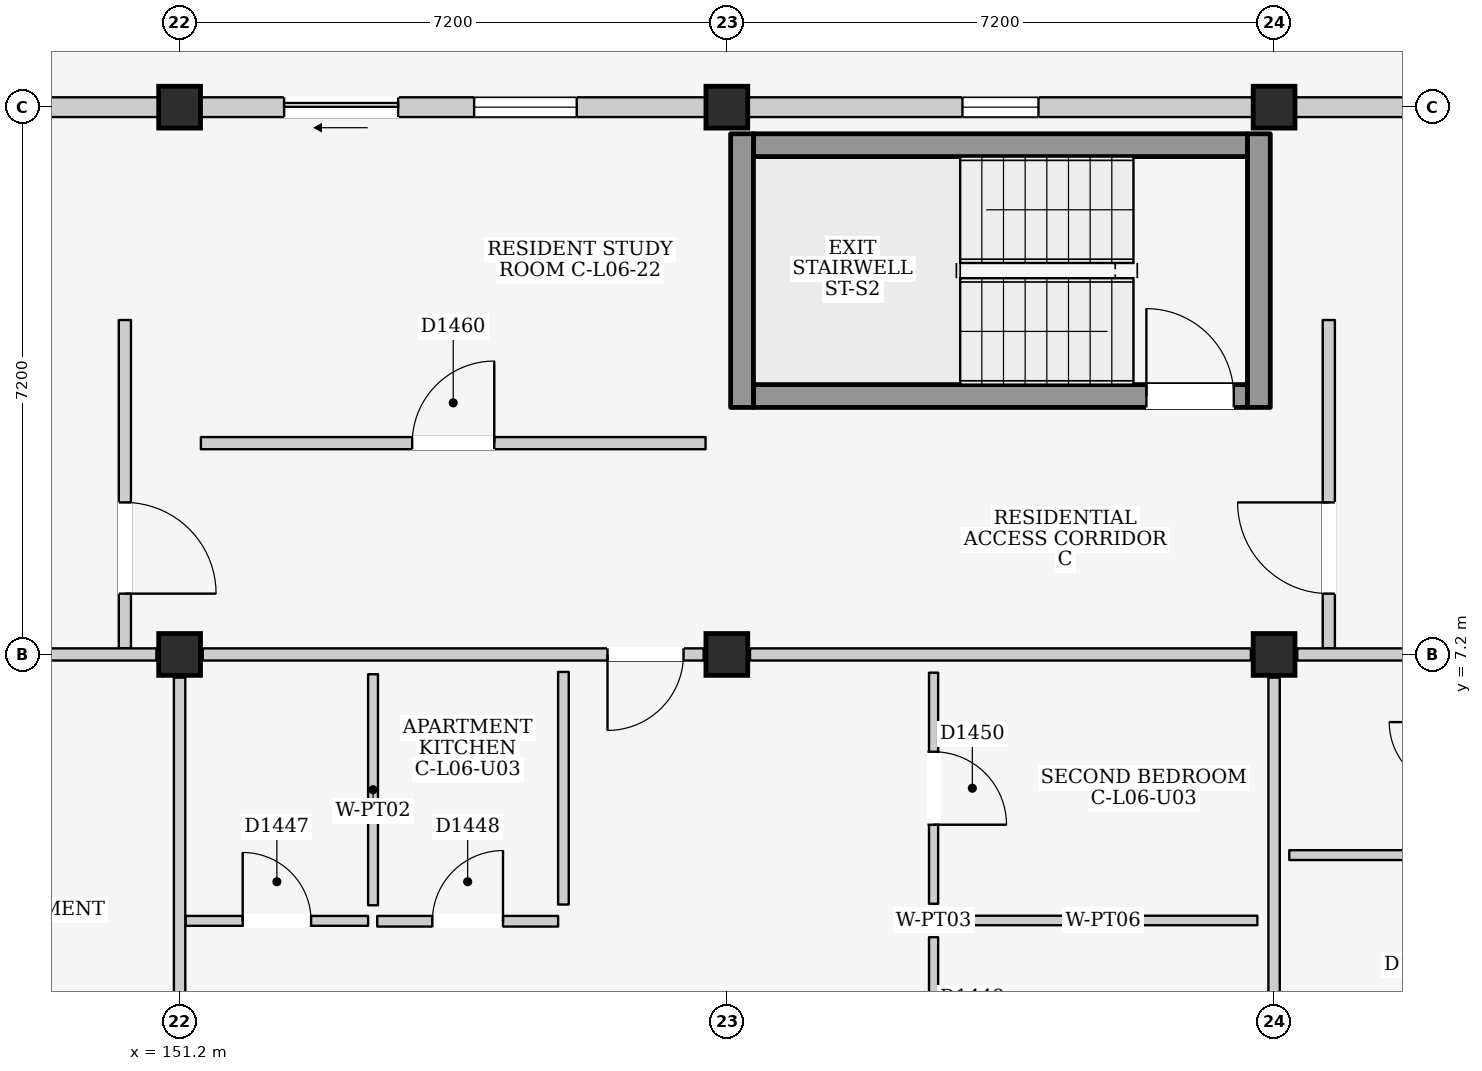
"""IFC4 building model, lengths in metres.
Left out: names, types, materials, properties, quantities, classifications, styles, units other than length and angle.
Written with IfcOpenShell. Run it as: python <this file> out.ifc"""

import sys

from ifc_helpers import new_model, si_unit, direction, frame, frame_2d, origin, origin_2d, place, context, subcontext, project, spatial, rectangle, extrude, element, fill, save


model = new_model("IFC4")
c1 = context("Model", 3, precision=1e-05, world=origin(), true_north=direction((0.0, 1.0)))
c2 = subcontext(c1, "Body", "Model", "MODEL_VIEW")
j1 = project(units=[si_unit("LENGTHUNIT", "METRE"), si_unit("PLANEANGLEUNIT", "RADIAN")], contexts=[c1])
p1 = place(None, origin())
s1 = spatial("IfcSite", under=j1, at=p1, CompositionType="ELEMENT")
p2 = place(p1, origin())
s2 = spatial("IfcBuilding", under=s1, at=p2, CompositionType="ELEMENT")
p3 = place(p2, frame((0.0, 0.0, 21.9)))
s3 = spatial("IfcBuildingStorey", under=s2, at=p3, CompositionType="ELEMENT", Elevation=21.9)
for number, where, z_axis, x_axis in (
    (1, (151.2, 7.2, 0.0), (0.0, 0.0, 1.0), (1.0, 0.0, 0.0)),
    (2, (151.2, 14.4, 0.0), (0.0, 0.0, 1.0), (1.0, 0.0, 0.0)),
    (3, (158.4, 7.2, 0.0), (0.0, 0.0, 1.0), (1.0, 0.0, 0.0)),
    (4, (158.4, 14.4, 0.0), (0.0, 0.0, 1.0), (1.0, 0.0, 0.0)),
    (5, (165.6, 7.2, 0.0), (0.0, 0.0, 1.0), (1.0, 0.0, 0.0)),
    (6, (165.6, 14.4, 0.0), (0.0, 0.0, 1.0), (1.0, 0.0, 0.0)),
):
    element("IfcColumn", number, at=place(p3, frame(where, z_axis=z_axis, x_axis=x_axis)), inside=s3, PredefinedType="COLUMN", context=c2, shape_type="SweptSolid", body=[
        extrude(rectangle(XDim=0.55, YDim=0.55, at=origin_2d()), origin(), (0.0, 0.0, 1.0), 3.2),
    ])
p4 = place(p3, frame((144.275, 14.4, 0.0), z_axis=(0.0, 0.0, 1.0), x_axis=(1.0, 0.0, 0.0)))
e7 = element("IfcWall", 7, at=p4, inside=s3, PredefinedType="ELEMENTEDWALL", context=c2, shape_type="SweptSolid", body=[
    extrude(rectangle(XDim=6.65, YDim=0.26, at=frame_2d((3.325, 0.0))), origin(), (0.0, 0.0, 1.0), 2.365),
])
p5 = place(p4, frame((2.825, 0.0, 1.2)))
e8 = element("IfcOpeningElement", 8, at=p5, cuts=e7, PredefinedType="OPENING", context=c2, shape_type="SweptSolid", body=[
    extrude(rectangle(XDim=1.0, YDim=0.9, at=frame_2d((0.5, 0.45))), frame((0.0, 0.145, 0.0), z_axis=(0.0, -1.0, 0.0), x_axis=(1.0, 0.0, 0.0)), (0.0, 0.0, 1.0), 0.29),
])
p6 = place(p3, frame((151.475, 14.4, 0.0), z_axis=(0.0, 0.0, 1.0), x_axis=(1.0, 0.0, 0.0)))
e9 = element("IfcWall", 9, at=p6, inside=s3, PredefinedType="ELEMENTEDWALL", context=c2, shape_type="SweptSolid", body=[
    extrude(rectangle(XDim=6.65, YDim=0.26, at=frame_2d((3.325, 0.0))), origin(), (0.0, 0.0, 1.0), 2.365),
])
p7 = place(p6, frame((1.1, 0.0, 0.0)))
e10 = element("IfcOpeningElement", 10, at=p7, cuts=e9, PredefinedType="OPENING", context=c2, shape_type="SweptSolid", body=[
    extrude(rectangle(XDim=1.5, YDim=2.12, at=frame_2d((0.75, 1.06))), frame((0.0, 0.145, 0.0), z_axis=(0.0, -1.0, 0.0), x_axis=(1.0, 0.0, 0.0)), (0.0, 0.0, 1.0), 0.29),
])
p8 = place(p6, frame((3.6, 0.0, 0.755)))
e11 = element("IfcOpeningElement", 11, at=p8, cuts=e9, PredefinedType="OPENING", context=c2, shape_type="SweptSolid", body=[
    extrude(rectangle(XDim=1.35, YDim=1.5, at=frame_2d((0.675, 0.75))), frame((0.0, 0.145, 0.0), z_axis=(0.0, -1.0, 0.0), x_axis=(1.0, 0.0, 0.0)), (0.0, 0.0, 1.0), 0.29),
])
p9 = place(p3, frame((158.675, 14.4, 0.0), z_axis=(0.0, 0.0, 1.0), x_axis=(1.0, 0.0, 0.0)))
e12 = element("IfcWall", 12, at=p9, inside=s3, PredefinedType="ELEMENTEDWALL", context=c2, shape_type="SweptSolid", body=[
    extrude(rectangle(XDim=6.65, YDim=0.26, at=frame_2d((3.325, 0.0))), origin(), (0.0, 0.0, 1.0), 2.365),
])
p10 = place(p9, frame((2.825, 0.0, 1.2)))
e13 = element("IfcOpeningElement", 13, at=p10, cuts=e12, PredefinedType="OPENING", context=c2, shape_type="SweptSolid", body=[
    extrude(rectangle(XDim=1.0, YDim=0.9, at=frame_2d((0.5, 0.45))), frame((0.0, 0.145, 0.0), z_axis=(0.0, -1.0, 0.0), x_axis=(1.0, 0.0, 0.0)), (0.0, 0.0, 1.0), 0.29),
])
p11 = place(p3, frame((165.875, 14.4, 0.0), z_axis=(0.0, 0.0, 1.0), x_axis=(1.0, 0.0, 0.0)))
e14 = element("IfcWall", 14, at=p11, inside=s3, PredefinedType="ELEMENTEDWALL", context=c2, shape_type="SweptSolid", body=[
    extrude(rectangle(XDim=6.65, YDim=0.26, at=frame_2d((3.325, 0.0))), origin(), (0.0, 0.0, 1.0), 2.365),
])
p12 = place(p11, frame((2.825, 0.0, 1.2)))
e15 = element("IfcOpeningElement", 15, at=p12, cuts=e14, PredefinedType="OPENING", context=c2, shape_type="SweptSolid", body=[
    extrude(rectangle(XDim=1.0, YDim=0.9, at=frame_2d((0.5, 0.45))), frame((0.0, 0.145, 0.0), z_axis=(0.0, -1.0, 0.0), x_axis=(1.0, 0.0, 0.0)), (0.0, 0.0, 1.0), 0.29),
])
p13 = place(p3, frame((150.48, 7.28, 0.0), z_axis=(0.0, 0.0, 1.0), x_axis=(0.0, 1.0, 0.0)))
e16 = element("IfcWall", 16, at=p13, inside=s3, PredefinedType="PARTITIONING", context=c2, shape_type="SweptSolid", body=[
    extrude(rectangle(XDim=4.32, YDim=0.16, at=frame_2d((2.16, 0.0))), origin(), (0.0, 0.0, 1.0), 2.98),
])
p14 = place(p13, frame((0.72, 0.0, 0.0)))
e17 = element("IfcOpeningElement", 17, at=p14, cuts=e16, PredefinedType="OPENING", context=c2, shape_type="SweptSolid", body=[
    extrude(rectangle(XDim=1.2, YDim=2.2, at=frame_2d((0.6, 1.1))), frame((0.0, 0.095, 0.0), z_axis=(0.0, -1.0, 0.0), x_axis=(1.0, 0.0, 0.0)), (0.0, 0.0, 1.0), 0.19),
])
p15 = place(p3, frame((158.75, 10.6, 0.0), z_axis=(0.0, 0.0, 1.0), x_axis=(1.0, 0.0, 0.0)))
e18 = element("IfcWall", 18, at=p15, inside=s3, PredefinedType="SHEAR", context=c2, shape_type="SweptSolid", body=[
    extrude(rectangle(XDim=6.5, YDim=0.3, at=frame_2d((3.25, 0.0))), origin(), (0.0, 0.0, 1.0), 2.98),
])
p16 = place(p15, frame((5.17, 0.0, 0.0)))
e19 = element("IfcOpeningElement", 19, at=p16, cuts=e18, PredefinedType="OPENING", context=c2, shape_type="SweptSolid", body=[
    extrude(rectangle(XDim=1.15, YDim=2.2, at=frame_2d((0.575, 1.1))), frame((0.0, 0.165, 0.0), z_axis=(0.0, -1.0, 0.0), x_axis=(1.0, 0.0, 0.0)), (0.0, 0.0, 1.0), 0.33),
])
p17 = place(p3, frame((158.75, 13.9, 0.0), z_axis=(0.0, 0.0, 1.0), x_axis=(1.0, 0.0, 0.0)))
e20 = element("IfcWall", 20, at=p17, inside=s3, PredefinedType="SHEAR", context=c2, shape_type="SweptSolid", body=[
    extrude(rectangle(XDim=6.5, YDim=0.3, at=frame_2d((3.25, 0.0))), origin(), (0.0, 0.0, 1.0), 2.98),
])
for number, where, z_axis, x_axis in (
    (21, (158.6, 10.45, 0.0), (0.0, 0.0, 1.0), (0.0, 1.0, 0.0)),
    (22, (165.4, 10.45, 0.0), (0.0, 0.0, 1.0), (0.0, 1.0, 0.0)),
):
    element("IfcWall", number, at=place(p3, frame(where, z_axis=z_axis, x_axis=x_axis)), inside=s3, PredefinedType="SHEAR", context=c2, shape_type="SweptSolid", body=[
        extrude(rectangle(XDim=3.6, YDim=0.3, at=frame_2d((1.8, 0.0))), origin(), (0.0, 0.0, 1.0), 2.98),
    ])
p18 = place(p3, frame((166.32, 7.28, 0.0), z_axis=(0.0, 0.0, 1.0), x_axis=(0.0, 1.0, 0.0)))
e23 = element("IfcWall", 23, at=p18, inside=s3, PredefinedType="PARTITIONING", context=c2, shape_type="SweptSolid", body=[
    extrude(rectangle(XDim=4.32, YDim=0.16, at=frame_2d((2.16, 0.0))), origin(), (0.0, 0.0, 1.0), 2.98),
])
p19 = place(p18, frame((0.72, 0.0, 0.0)))
e24 = element("IfcOpeningElement", 24, at=p19, cuts=e23, PredefinedType="OPENING", context=c2, shape_type="SweptSolid", body=[
    extrude(rectangle(XDim=1.2, YDim=2.2, at=frame_2d((0.6, 1.1))), frame((0.0, 0.095, 0.0), z_axis=(0.0, -1.0, 0.0), x_axis=(1.0, 0.0, 0.0)), (0.0, 0.0, 1.0), 0.19),
])
p20 = place(p3, frame((144.305, 7.2, 0.0), z_axis=(0.0, 0.0, 1.0), x_axis=(1.0, 0.0, 0.0)))
e25 = element("IfcWall", 25, at=p20, inside=s3, PredefinedType="PARTITIONING", context=c2, shape_type="SweptSolid", body=[
    extrude(rectangle(XDim=6.59, YDim=0.16, at=frame_2d((3.295, 0.0))), origin(), (0.0, 0.0, 1.0), 2.365),
])
p21 = place(p20, frame((4.145, 0.0, 0.0)))
e26 = element("IfcOpeningElement", 26, at=p21, cuts=e25, PredefinedType="OPENING", context=c2, shape_type="SweptSolid", body=[
    extrude(rectangle(XDim=1.0, YDim=2.15, at=frame_2d((0.5, 1.075))), frame((0.0, 0.095, 0.0), z_axis=(0.0, -1.0, 0.0), x_axis=(1.0, 0.0, 0.0)), (0.0, 0.0, 1.0), 0.19),
])
p22 = place(p3, frame((151.2, 0.305, 0.0), z_axis=(0.0, 0.0, 1.0), x_axis=(0.0, 1.0, 0.0)))
e27 = element("IfcWall", 27, at=p22, inside=s3, PredefinedType="PARTITIONING", context=c2, shape_type="SweptSolid", body=[
    extrude(rectangle(XDim=6.59, YDim=0.15, at=frame_2d((3.295, 0.0))), origin(), (0.0, 0.0, 1.0), 2.465),
])
p23 = place(p3, frame((151.505, 7.2, 0.0), z_axis=(0.0, 0.0, 1.0), x_axis=(1.0, 0.0, 0.0)))
e28 = element("IfcWall", 28, at=p23, inside=s3, PredefinedType="PARTITIONING", context=c2, shape_type="SweptSolid", body=[
    extrude(rectangle(XDim=6.59, YDim=0.16, at=frame_2d((3.295, 0.0))), origin(), (0.0, 0.0, 1.0), 2.365),
])
p24 = place(p23, frame((5.325, 0.0, 0.0)))
e29 = element("IfcOpeningElement", 29, at=p24, cuts=e28, PredefinedType="OPENING", context=c2, shape_type="SweptSolid", body=[
    extrude(rectangle(XDim=1.0, YDim=2.15, at=frame_2d((0.5, 1.075))), frame((0.0, 0.095, 0.0), z_axis=(0.0, -1.0, 0.0), x_axis=(1.0, 0.0, 0.0)), (0.0, 0.0, 1.0), 0.19),
])
p25 = place(p3, frame((158.705, 7.2, 0.0), z_axis=(0.0, 0.0, 1.0), x_axis=(1.0, 0.0, 0.0)))
e30 = element("IfcWall", 30, at=p25, inside=s3, PredefinedType="PARTITIONING", context=c2, shape_type="SweptSolid", body=[
    extrude(rectangle(XDim=6.59, YDim=0.16, at=frame_2d((3.295, 0.0))), origin(), (0.0, 0.0, 1.0), 2.365),
])
p26 = place(p3, frame((165.6, 0.305, 0.0), z_axis=(0.0, 0.0, 1.0), x_axis=(0.0, 1.0, 0.0)))
e31 = element("IfcWall", 31, at=p26, inside=s3, PredefinedType="PARTITIONING", context=c2, shape_type="SweptSolid", body=[
    extrude(rectangle(XDim=6.59, YDim=0.15, at=frame_2d((3.295, 0.0))), origin(), (0.0, 0.0, 1.0), 2.465),
])
p27 = place(p3, frame((151.28, 3.695, 0.0), z_axis=(0.0, 0.0, 1.0), x_axis=(1.0, 0.0, 0.0)))
e32 = element("IfcWall", 32, at=p27, inside=s3, PredefinedType="PARTITIONING", context=c2, shape_type="SweptSolid", body=[
    extrude(rectangle(XDim=2.4, YDim=0.13, at=frame_2d((1.2, 0.0))), origin(), (0.0, 0.0, 1.0), 2.98),
])
p28 = place(p27, frame((0.75, 0.0, 0.0)))
e33 = element("IfcOpeningElement", 33, at=p28, cuts=e32, PredefinedType="OPENING", context=c2, shape_type="SweptSolid", body=[
    extrude(rectangle(XDim=0.9, YDim=2.1, at=frame_2d((0.45, 1.05))), frame((0.0, 0.08, 0.0), z_axis=(0.0, -1.0, 0.0), x_axis=(1.0, 0.0, 0.0)), (0.0, 0.0, 1.0), 0.16),
])
p29 = place(p3, frame((153.745, 3.9, 0.0), z_axis=(0.0, 0.0, 1.0), x_axis=(0.0, 1.0, 0.0)))
e34 = element("IfcWall", 34, at=p29, inside=s3, PredefinedType="PARTITIONING", context=c2, shape_type="SweptSolid", body=[
    extrude(rectangle(XDim=3.04, YDim=0.13, at=frame_2d((1.52, 0.0))), origin(), (0.0, 0.0, 1.0), 2.98),
])
p30 = place(p3, frame((153.8, 3.69, 0.0), z_axis=(0.0, 0.0, 1.0), x_axis=(1.0, 0.0, 0.0)))
e35 = element("IfcWall", 35, at=p30, inside=s3, PredefinedType="PARTITIONING", context=c2, shape_type="SweptSolid", body=[
    extrude(rectangle(XDim=2.38, YDim=0.14, at=frame_2d((1.19, 0.0))), origin(), (0.0, 0.0, 1.0), 2.98),
])
p31 = place(p30, frame((0.725, 0.0, 0.0)))
e36 = element("IfcOpeningElement", 36, at=p31, cuts=e35, PredefinedType="OPENING", context=c2, shape_type="SweptSolid", body=[
    extrude(rectangle(XDim=0.93, YDim=2.14, at=frame_2d((0.465, 1.07))), frame((0.0, 0.085, 0.0), z_axis=(0.0, -1.0, 0.0), x_axis=(1.0, 0.0, 0.0)), (0.0, 0.0, 1.0), 0.17),
])
p32 = place(p3, frame((156.25, 3.91, 0.0), z_axis=(0.0, 0.0, 1.0), x_axis=(0.0, 1.0, 0.0)))
e37 = element("IfcWall", 37, at=p32, inside=s3, PredefinedType="PARTITIONING", context=c2, shape_type="SweptSolid", body=[
    extrude(rectangle(XDim=3.06, YDim=0.14, at=frame_2d((1.53, 0.0))), origin(), (0.0, 0.0, 1.0), 2.98),
])
p33 = place(p3, frame((161.12, 0.44, 0.0), z_axis=(0.0, 0.0, 1.0), x_axis=(0.0, 1.0, 0.0)))
e38 = element("IfcWall", 38, at=p33, inside=s3, PredefinedType="PARTITIONING", context=c2, shape_type="SweptSolid", body=[
    extrude(rectangle(XDim=3.04, YDim=0.12, at=frame_2d((1.52, 0.0))), origin(), (0.0, 0.0, 1.0), 2.98),
])
p34 = place(p33, frame((1.045, 0.0, 0.0)))
e39 = element("IfcOpeningElement", 39, at=p34, cuts=e38, PredefinedType="OPENING", context=c2, shape_type="SweptSolid", body=[
    extrude(rectangle(XDim=0.95, YDim=2.15, at=frame_2d((0.475, 1.075))), frame((0.0, 0.075, 0.0), z_axis=(0.0, -1.0, 0.0), x_axis=(1.0, 0.0, 0.0)), (0.0, 0.0, 1.0), 0.15),
])
p35 = place(p3, frame((161.32, 3.7, 0.0), z_axis=(0.0, 0.0, 1.0), x_axis=(1.0, 0.0, 0.0)))
e40 = element("IfcWall", 40, at=p35, inside=s3, PredefinedType="PARTITIONING", context=c2, shape_type="SweptSolid", body=[
    extrude(rectangle(XDim=4.06, YDim=0.125, at=frame_2d((2.03, 0.0))), origin(), (0.0, 0.0, 1.0), 2.98),
])
p36 = place(p3, frame((161.12, 3.92, 0.0), z_axis=(0.0, 0.0, 1.0), x_axis=(0.0, 1.0, 0.0)))
e41 = element("IfcWall", 41, at=p36, inside=s3, PredefinedType="PARTITIONING", context=c2, shape_type="SweptSolid", body=[
    extrude(rectangle(XDim=3.04, YDim=0.12, at=frame_2d((1.52, 0.0))), origin(), (0.0, 0.0, 1.0), 2.98),
])
p37 = place(p36, frame((1.04, 0.0, 0.0)))
e42 = element("IfcOpeningElement", 42, at=p37, cuts=e41, PredefinedType="OPENING", context=c2, shape_type="SweptSolid", body=[
    extrude(rectangle(XDim=0.96, YDim=2.15, at=frame_2d((0.48, 1.075))), frame((0.0, 0.075, 0.0), z_axis=(0.0, -1.0, 0.0), x_axis=(1.0, 0.0, 0.0)), (0.0, 0.0, 1.0), 0.15),
])
p38 = place(p3, frame((165.905, 7.2, 0.0), z_axis=(0.0, 0.0, 1.0), x_axis=(1.0, 0.0, 0.0)))
e43 = element("IfcWall", 43, at=p38, inside=s3, PredefinedType="PARTITIONING", context=c2, shape_type="SweptSolid", body=[
    extrude(rectangle(XDim=6.59, YDim=0.16, at=frame_2d((3.295, 0.0))), origin(), (0.0, 0.0, 1.0), 2.365),
])
p39 = place(p38, frame((4.145, 0.0, 0.0)))
e44 = element("IfcOpeningElement", 44, at=p39, cuts=e43, PredefinedType="OPENING", context=c2, shape_type="SweptSolid", body=[
    extrude(rectangle(XDim=1.0, YDim=2.15, at=frame_2d((0.5, 1.075))), frame((0.0, 0.095, 0.0), z_axis=(0.0, -1.0, 0.0), x_axis=(1.0, 0.0, 0.0)), (0.0, 0.0, 1.0), 0.19),
])
p40 = place(p3, frame((165.8, 4.56, 0.0), z_axis=(0.0, 0.0, 1.0), x_axis=(1.0, 0.0, 0.0)))
e45 = element("IfcWall", 45, at=p40, inside=s3, PredefinedType="PARTITIONING", context=c2, shape_type="SweptSolid", body=[
    extrude(rectangle(XDim=2.05, YDim=0.13, at=frame_2d((1.025, 0.0))), origin(), (0.0, 0.0, 1.0), 2.98),
])
p41 = place(p3, frame((151.48, 9.98, 0.0), z_axis=(0.0, 0.0, 1.0), x_axis=(1.0, 0.0, 0.0)))
e46 = element("IfcWall", 46, at=p41, inside=s3, PredefinedType="PARTITIONING", context=c2, shape_type="SweptSolid", body=[
    extrude(rectangle(XDim=6.64, YDim=0.16, at=frame_2d((3.32, 0.0))), origin(), (0.0, 0.0, 1.0), 2.98),
])
p42 = place(p41, frame((2.78, 0.0, 0.0)))
e47 = element("IfcOpeningElement", 47, at=p42, cuts=e46, PredefinedType="OPENING", context=c2, shape_type="SweptSolid", body=[
    extrude(rectangle(XDim=1.08, YDim=2.22, at=frame_2d((0.54, 1.11))), frame((0.0, 0.095, 0.0), z_axis=(0.0, -1.0, 0.0), x_axis=(1.0, 0.0, 0.0)), (0.0, 0.0, 1.0), 0.19),
])
p43 = place(p7, frame((1.5, 0.0, 0.0), z_axis=(0.0, 0.0, 1.0), x_axis=(-1.0, 0.0, 0.0)))
e48 = element("IfcDoor", 48, at=p43, inside=s3, OperationType="SLIDING_TO_LEFT", PredefinedType="DOOR", context=c2, shape_type="SweptSolid", body=[
    extrude(rectangle(XDim=1.5, YDim=2.12, at=frame_2d((0.75, 1.06))), frame((0.0, 0.025, 0.0), z_axis=(0.0, -1.0, 0.0), x_axis=(1.0, 0.0, 0.0)), (0.0, 0.0, 1.0), 0.05),
])
fill(e10, e48)
p44 = place(p8, origin())
e49 = element("IfcWindow", 49, at=p44, inside=s3, PartitioningType="SINGLE_PANEL", PredefinedType="WINDOW", context=c2, shape_type="SweptSolid", body=[
    extrude(rectangle(XDim=1.35, YDim=1.5, at=frame_2d((0.675, 0.75))), frame((0.0, 0.03, 0.0), z_axis=(0.0, -1.0, 0.0), x_axis=(1.0, 0.0, 0.0)), (0.0, 0.0, 1.0), 0.06),
])
fill(e11, e49)
p45 = place(p10, origin())
e50 = element("IfcWindow", 50, at=p45, inside=s3, PartitioningType="SINGLE_PANEL", PredefinedType="WINDOW", context=c2, shape_type="SweptSolid", body=[
    extrude(rectangle(XDim=1.0, YDim=0.9, at=frame_2d((0.5, 0.45))), frame((0.0, 0.03, 0.0), z_axis=(0.0, -1.0, 0.0), x_axis=(1.0, 0.0, 0.0)), (0.0, 0.0, 1.0), 0.06),
])
fill(e13, e50)
p46 = place(p14, frame((1.2, 0.0, 0.0), z_axis=(0.0, 0.0, 1.0), x_axis=(-1.0, 0.0, 0.0)))
e51 = element("IfcDoor", 51, at=p46, inside=s3, OperationType="SINGLE_SWING_RIGHT", PredefinedType="DOOR", context=c2, shape_type="SweptSolid", body=[
    extrude(rectangle(XDim=1.2, YDim=2.2, at=frame_2d((0.6, 1.1))), frame((0.0, 0.025, 0.0), z_axis=(0.0, -1.0, 0.0), x_axis=(1.0, 0.0, 0.0)), (0.0, 0.0, 1.0), 0.05),
])
fill(e17, e51)
p47 = place(p16, origin())
e52 = element("IfcDoor", 52, at=p47, inside=s3, OperationType="SINGLE_SWING_LEFT", PredefinedType="DOOR", context=c2, shape_type="SweptSolid", body=[
    extrude(rectangle(XDim=1.15, YDim=2.2, at=frame_2d((0.575, 1.1))), frame((0.0, 0.025, 0.0), z_axis=(0.0, -1.0, 0.0), x_axis=(1.0, 0.0, 0.0)), (0.0, 0.0, 1.0), 0.05),
])
fill(e19, e52)
p48 = place(p19, origin())
e53 = element("IfcDoor", 53, at=p48, inside=s3, OperationType="SINGLE_SWING_RIGHT", PredefinedType="DOOR", context=c2, shape_type="SweptSolid", body=[
    extrude(rectangle(XDim=1.2, YDim=2.2, at=frame_2d((0.6, 1.1))), frame((0.0, 0.025, 0.0), z_axis=(0.0, -1.0, 0.0), x_axis=(1.0, 0.0, 0.0)), (0.0, 0.0, 1.0), 0.05),
])
fill(e24, e53)
p49 = place(p24, frame((1.0, 0.0, 0.0), z_axis=(0.0, 0.0, 1.0), x_axis=(-1.0, 0.0, 0.0)))
e54 = element("IfcDoor", 54, at=p49, inside=s3, OperationType="SINGLE_SWING_RIGHT", PredefinedType="DOOR", context=c2, shape_type="SweptSolid", body=[
    extrude(rectangle(XDim=1.0, YDim=2.15, at=frame_2d((0.5, 1.075))), frame((0.0, 0.025, 0.0), z_axis=(0.0, -1.0, 0.0), x_axis=(1.0, 0.0, 0.0)), (0.0, 0.0, 1.0), 0.05),
])
fill(e29, e54)
p50 = place(p28, origin())
e55 = element("IfcDoor", 55, at=p50, inside=s3, OperationType="SINGLE_SWING_LEFT", PredefinedType="DOOR", context=c2, shape_type="SweptSolid", body=[
    extrude(rectangle(XDim=0.9, YDim=2.1, at=frame_2d((0.45, 1.05))), frame((0.0, 0.025, 0.0), z_axis=(0.0, -1.0, 0.0), x_axis=(1.0, 0.0, 0.0)), (0.0, 0.0, 1.0), 0.05),
])
fill(e33, e55)
p51 = place(p31, origin())
e56 = element("IfcDoor", 56, at=p51, inside=s3, OperationType="SINGLE_SWING_RIGHT", PredefinedType="DOOR", context=c2, shape_type="SweptSolid", body=[
    extrude(rectangle(XDim=0.93, YDim=2.14, at=frame_2d((0.465, 1.07))), frame((0.0, 0.025, 0.0), z_axis=(0.0, -1.0, 0.0), x_axis=(1.0, 0.0, 0.0)), (0.0, 0.0, 1.0), 0.05),
])
fill(e36, e56)
p52 = place(p37, frame((0.96, 0.0, 0.0), z_axis=(0.0, 0.0, 1.0), x_axis=(-1.0, 0.0, 0.0)))
e57 = element("IfcDoor", 57, at=p52, inside=s3, OperationType="SINGLE_SWING_RIGHT", PredefinedType="DOOR", context=c2, shape_type="SweptSolid", body=[
    extrude(rectangle(XDim=0.96, YDim=2.15, at=frame_2d((0.48, 1.075))), frame((0.0, 0.025, 0.0), z_axis=(0.0, -1.0, 0.0), x_axis=(1.0, 0.0, 0.0)), (0.0, 0.0, 1.0), 0.05),
])
fill(e42, e57)
p53 = place(p42, origin())
e58 = element("IfcDoor", 58, at=p53, inside=s3, OperationType="SINGLE_SWING_RIGHT", PredefinedType="DOOR", context=c2, shape_type="SweptSolid", body=[
    extrude(rectangle(XDim=1.08, YDim=2.22, at=frame_2d((0.54, 1.11))), frame((0.0, 0.025, 0.0), z_axis=(0.0, -1.0, 0.0), x_axis=(1.0, 0.0, 0.0)), (0.0, 0.0, 1.0), 0.05),
])
fill(e47, e58)
save(model, sys.argv[1])
